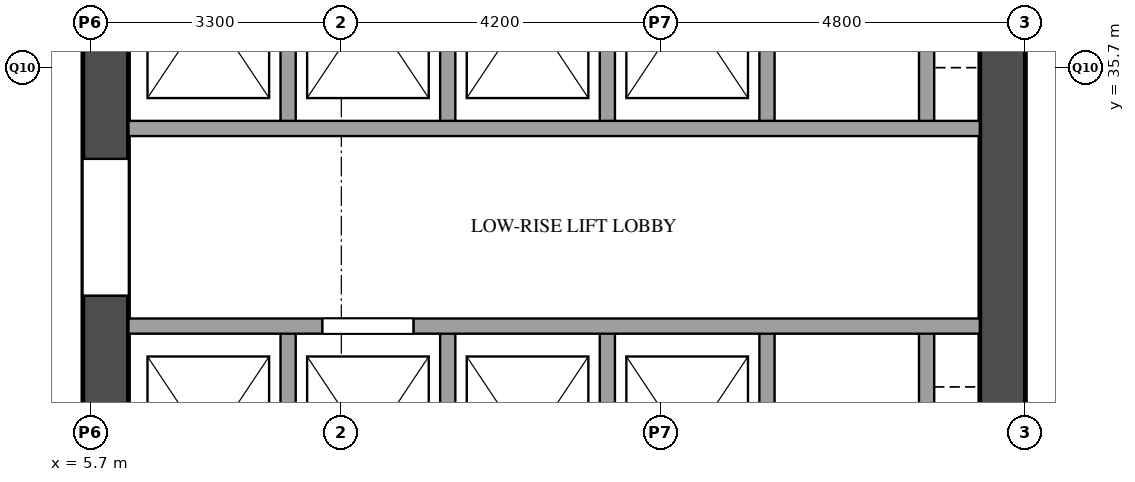
"""IFC4 building model, lengths in metres.
Left out: names, types, materials, properties, quantities, classifications, styles, units other than length and angle.
Written with IfcOpenShell. Run it as: python <this file> out.ifc"""

import sys

from ifc_helpers import new_model, si_unit, direction, frame, frame_2d, origin, place, context, subcontext, project, spatial, rectangle, extrude, element, fill, save


model = new_model("IFC4")
c1 = context("Model", 3, precision=1e-05, world=origin(), true_north=direction((0.0, 1.0)))
c2 = subcontext(c1, "Body", "Model", "MODEL_VIEW")
j1 = project(units=[si_unit("LENGTHUNIT", "METRE"), si_unit("PLANEANGLEUNIT", "RADIAN")], contexts=[c1])
p1 = place(None, origin())
s1 = spatial("IfcSite", under=j1, at=p1, CompositionType="ELEMENT")
p2 = place(p1, origin())
s2 = spatial("IfcBuilding", under=s1, at=p2, CompositionType="ELEMENT")
p3 = place(p2, frame((0.0, 0.0, 108.2)))
s3 = spatial("IfcBuildingStorey", under=s2, at=p3, CompositionType="ELEMENT", Elevation=108.2)
p4 = place(p3, frame((5.9, 29.1, 0.0), z_axis=(0.0, 0.0, 1.0), x_axis=(0.0, 1.0, 0.0)))
e1 = element("IfcWall", 1, at=p4, inside=s3, PredefinedType="SHEAR", context=c2, shape_type="SweptSolid", body=[
    extrude(rectangle(XDim=20.3, YDim=0.6, at=frame_2d((10.15, 0.0))), origin(), (0.0, 0.0, 1.0), 3.5),
])
p5 = place(p4, frame((3.6, 0.0, 0.0)))
e2 = element("IfcOpeningElement", 2, at=p5, cuts=e1, PredefinedType="OPENING", context=c2, shape_type="SweptSolid", body=[
    extrude(rectangle(XDim=1.8, YDim=2.1, at=frame_2d((0.9, 1.05))), frame((0.0, 0.31, 0.0), z_axis=(0.0, -1.0, 0.0), x_axis=(1.0, 0.0, 0.0)), (0.0, 0.0, 1.0), 0.62),
])
p6 = place(p4, frame((16.4, 0.0, 0.0)))
e3 = element("IfcOpeningElement", 3, at=p6, cuts=e1, PredefinedType="OPENING", context=c2, shape_type="SweptSolid", body=[
    extrude(rectangle(XDim=1.0, YDim=2.1, at=frame_2d((0.5, 1.05))), frame((0.0, 0.31, 0.0), z_axis=(0.0, -1.0, 0.0), x_axis=(1.0, 0.0, 0.0)), (0.0, 0.0, 1.0), 0.62),
])
p7 = place(p3, frame((17.7, 29.1, 0.0), z_axis=(0.0, 0.0, 1.0), x_axis=(0.0, 1.0, 0.0)))
e4 = element("IfcWall", 4, at=p7, inside=s3, PredefinedType="SHEAR", context=c2, shape_type="SweptSolid", body=[
    extrude(rectangle(XDim=20.3, YDim=0.6, at=frame_2d((10.15, 0.0))), origin(), (0.0, 0.0, 1.0), 3.5),
])
p8 = place(p7, frame((1.25, 0.0, 0.0)))
e5 = element("IfcOpeningElement", 5, at=p8, cuts=e4, PredefinedType="OPENING", context=c2, shape_type="SweptSolid", body=[
    extrude(rectangle(XDim=0.7, YDim=2.1, at=frame_2d((0.35, 1.05))), frame((0.0, 0.31, 0.0), z_axis=(0.0, -1.0, 0.0), x_axis=(1.0, 0.0, 0.0)), (0.0, 0.0, 1.0), 0.62),
])
p9 = place(p7, frame((7.05, 0.0, 0.0)))
e6 = element("IfcOpeningElement", 6, at=p9, cuts=e4, PredefinedType="OPENING", context=c2, shape_type="SweptSolid", body=[
    extrude(rectangle(XDim=0.7, YDim=2.1, at=frame_2d((0.35, 1.05))), frame((0.0, 0.31, 0.0), z_axis=(0.0, -1.0, 0.0), x_axis=(1.0, 0.0, 0.0)), (0.0, 0.0, 1.0), 0.62),
])
p10 = place(p3, frame((8.3, 29.1, 0.0), z_axis=(0.0, 0.0, 1.0), x_axis=(0.0, 1.0, 0.0)))
e7 = element("IfcWall", 7, at=p10, inside=s3, PredefinedType="SOLIDWALL", context=c2, shape_type="SweptSolid", body=[
    extrude(rectangle(XDim=3.2, YDim=0.2, at=frame_2d((1.6, 0.0))), origin(), (0.0, 0.0, 1.0), 3.5),
])
p11 = place(p3, frame((8.3, 34.9, 0.0), z_axis=(0.0, 0.0, 1.0), x_axis=(0.0, 1.0, 0.0)))
e8 = element("IfcWall", 8, at=p11, inside=s3, PredefinedType="SOLIDWALL", context=c2, shape_type="SweptSolid", body=[
    extrude(rectangle(XDim=3.2, YDim=0.2, at=frame_2d((1.6, 0.0))), origin(), (0.0, 0.0, 1.0), 3.5),
])
p12 = place(p3, frame((10.4, 29.1, 0.0), z_axis=(0.0, 0.0, 1.0), x_axis=(0.0, 1.0, 0.0)))
e9 = element("IfcWall", 9, at=p12, inside=s3, PredefinedType="SOLIDWALL", context=c2, shape_type="SweptSolid", body=[
    extrude(rectangle(XDim=3.2, YDim=0.2, at=frame_2d((1.6, 0.0))), origin(), (0.0, 0.0, 1.0), 3.5),
])
p13 = place(p3, frame((10.4, 34.9, 0.0), z_axis=(0.0, 0.0, 1.0), x_axis=(0.0, 1.0, 0.0)))
e10 = element("IfcWall", 10, at=p13, inside=s3, PredefinedType="SOLIDWALL", context=c2, shape_type="SweptSolid", body=[
    extrude(rectangle(XDim=3.2, YDim=0.2, at=frame_2d((1.6, 0.0))), origin(), (0.0, 0.0, 1.0), 3.5),
])
p14 = place(p3, frame((12.5, 29.1, 0.0), z_axis=(0.0, 0.0, 1.0), x_axis=(0.0, 1.0, 0.0)))
e11 = element("IfcWall", 11, at=p14, inside=s3, PredefinedType="SOLIDWALL", context=c2, shape_type="SweptSolid", body=[
    extrude(rectangle(XDim=3.2, YDim=0.2, at=frame_2d((1.6, 0.0))), origin(), (0.0, 0.0, 1.0), 3.5),
])
p15 = place(p3, frame((12.5, 34.9, 0.0), z_axis=(0.0, 0.0, 1.0), x_axis=(0.0, 1.0, 0.0)))
e12 = element("IfcWall", 12, at=p15, inside=s3, PredefinedType="SOLIDWALL", context=c2, shape_type="SweptSolid", body=[
    extrude(rectangle(XDim=3.2, YDim=0.2, at=frame_2d((1.6, 0.0))), origin(), (0.0, 0.0, 1.0), 3.5),
])
p16 = place(p3, frame((14.6, 29.1, 0.0), z_axis=(0.0, 0.0, 1.0), x_axis=(0.0, 1.0, 0.0)))
e13 = element("IfcWall", 13, at=p16, inside=s3, PredefinedType="SOLIDWALL", context=c2, shape_type="SweptSolid", body=[
    extrude(rectangle(XDim=3.2, YDim=0.2, at=frame_2d((1.6, 0.0))), origin(), (0.0, 0.0, 1.0), 3.5),
])
p17 = place(p3, frame((14.6, 34.9, 0.0), z_axis=(0.0, 0.0, 1.0), x_axis=(0.0, 1.0, 0.0)))
e14 = element("IfcWall", 14, at=p17, inside=s3, PredefinedType="SOLIDWALL", context=c2, shape_type="SweptSolid", body=[
    extrude(rectangle(XDim=3.2, YDim=0.2, at=frame_2d((1.6, 0.0))), origin(), (0.0, 0.0, 1.0), 3.5),
])
p18 = place(p3, frame((16.7, 29.1, 0.0), z_axis=(0.0, 0.0, 1.0), x_axis=(0.0, 1.0, 0.0)))
e15 = element("IfcWall", 15, at=p18, inside=s3, PredefinedType="SOLIDWALL", context=c2, shape_type="SweptSolid", body=[
    extrude(rectangle(XDim=3.2, YDim=0.2, at=frame_2d((1.6, 0.0))), origin(), (0.0, 0.0, 1.0), 3.5),
])
p19 = place(p3, frame((16.7, 34.9, 0.0), z_axis=(0.0, 0.0, 1.0), x_axis=(0.0, 1.0, 0.0)))
e16 = element("IfcWall", 16, at=p19, inside=s3, PredefinedType="SOLIDWALL", context=c2, shape_type="SweptSolid", body=[
    extrude(rectangle(XDim=3.2, YDim=0.2, at=frame_2d((1.6, 0.0))), origin(), (0.0, 0.0, 1.0), 3.5),
])
p20 = place(p3, frame((6.2, 32.3, 0.0), z_axis=(0.0, 0.0, 1.0), x_axis=(1.0, 0.0, 0.0)))
e17 = element("IfcWall", 17, at=p20, inside=s3, PredefinedType="SOLIDWALL", context=c2, shape_type="SweptSolid", body=[
    extrude(rectangle(XDim=11.2, YDim=0.2, at=frame_2d((5.6, 0.0))), origin(), (0.0, 0.0, 1.0), 3.5),
])
p21 = place(p20, frame((2.55, 0.0, 0.0)))
e18 = element("IfcOpeningElement", 18, at=p21, cuts=e17, PredefinedType="OPENING", context=c2, shape_type="SweptSolid", body=[
    extrude(rectangle(XDim=1.2, YDim=2.1, at=frame_2d((0.6, 1.05))), frame((0.0, 0.11, 0.0), z_axis=(0.0, -1.0, 0.0), x_axis=(1.0, 0.0, 0.0)), (0.0, 0.0, 1.0), 0.22),
])
p22 = place(p3, frame((6.2, 34.9, 0.0), z_axis=(0.0, 0.0, 1.0), x_axis=(1.0, 0.0, 0.0)))
e19 = element("IfcWall", 19, at=p22, inside=s3, PredefinedType="SOLIDWALL", context=c2, shape_type="SweptSolid", body=[
    extrude(rectangle(XDim=11.2, YDim=0.2, at=frame_2d((5.6, 0.0))), origin(), (0.0, 0.0, 1.0), 3.5),
])
p23 = place(p21, origin())
e20 = element("IfcDoor", 20, at=p23, inside=s3, OperationType="SLIDING_TO_LEFT", PredefinedType="DOOR", context=c2, shape_type="SweptSolid", body=[
    extrude(rectangle(XDim=1.2, YDim=2.1, at=frame_2d((0.6, 1.05))), frame((0.0, 0.025, 0.0), z_axis=(0.0, -1.0, 0.0), x_axis=(1.0, 0.0, 0.0)), (0.0, 0.0, 1.0), 0.05),
])
fill(e18, e20)
p24 = place(p5, origin())
e21 = element("IfcDoor", 21, at=p24, inside=s3, OperationType="DOUBLE_DOOR_SINGLE_SWING", PredefinedType="DOOR", context=c2, shape_type="SweptSolid", body=[
    extrude(rectangle(XDim=1.8, YDim=2.1, at=frame_2d((0.9, 1.05))), frame((0.0, 0.025, 0.0), z_axis=(0.0, -1.0, 0.0), x_axis=(1.0, 0.0, 0.0)), (0.0, 0.0, 1.0), 0.05),
])
fill(e2, e21)
save(model, sys.argv[1])
